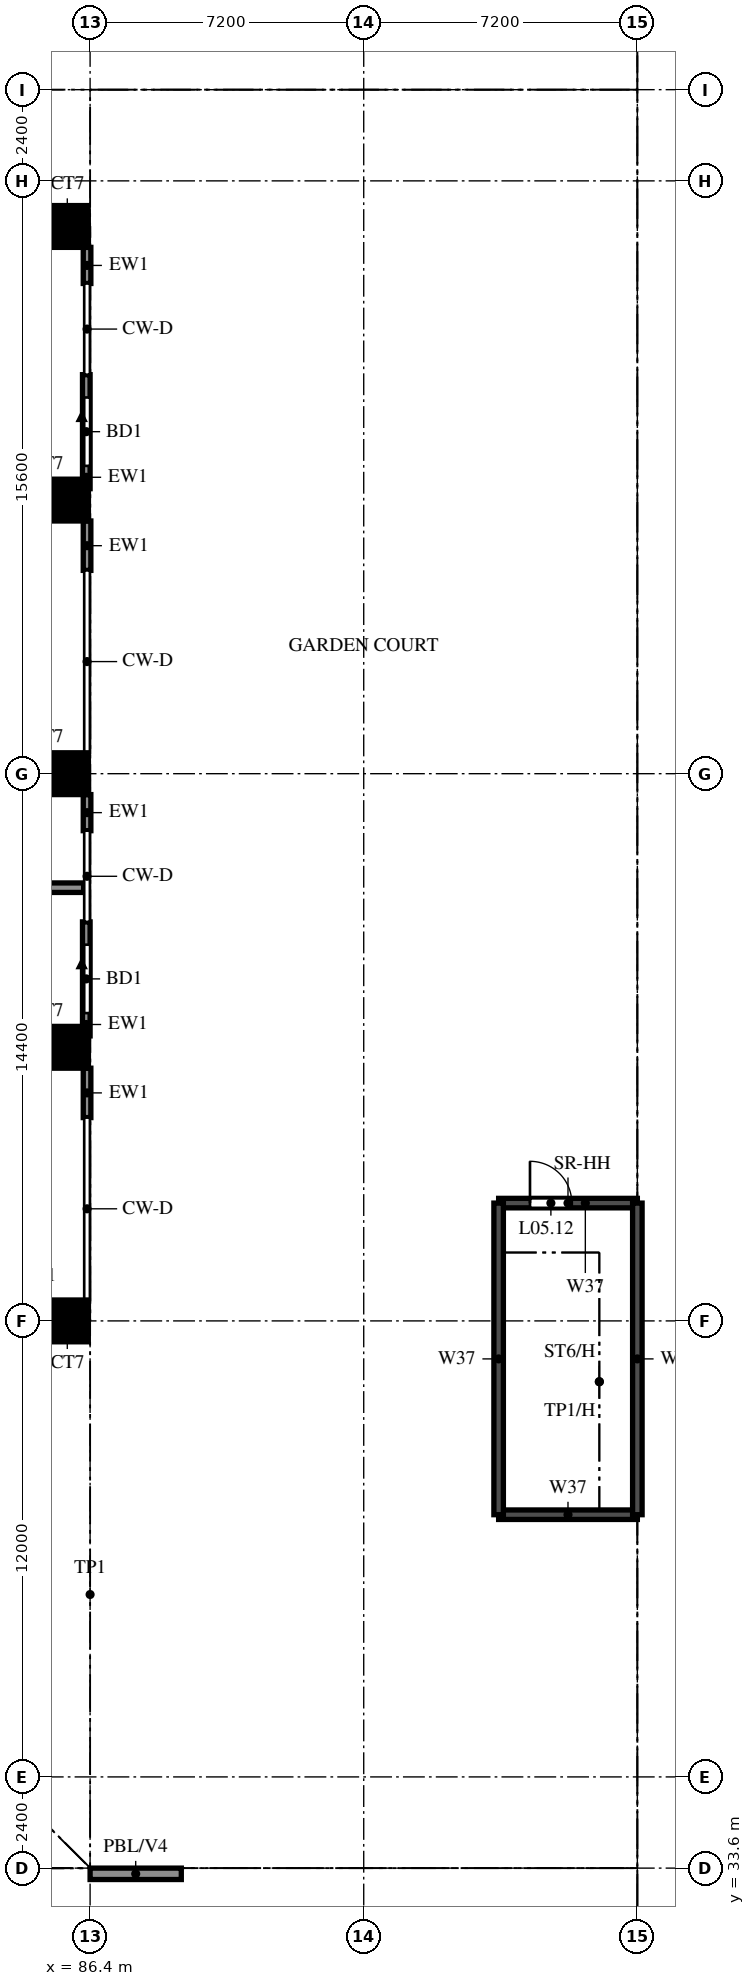
"""IFC4 building model, lengths in metres.
Left out: names, types, materials, properties, quantities, classifications, styles, units other than length and angle.
Written with IfcOpenShell. Run it as: python <this file> out.ifc"""

import sys

from ifc_helpers import new_model, si_unit, direction, frame, frame_2d, origin, origin_2d, place, context, subcontext, project, spatial, rectangle, extrude, source, transform, mapped, element, fill, save


model = new_model("IFC4")
c1 = context("Model", 3, precision=1e-05, world=origin(), true_north=direction((0.0, 1.0)))
c2 = subcontext(c1, "Body", "Model", "MODEL_VIEW")
j1 = project(units=[si_unit("LENGTHUNIT", "METRE"), si_unit("PLANEANGLEUNIT", "RADIAN")], contexts=[c1])
p1 = place(None, origin())
s1 = spatial("IfcSite", under=j1, at=p1, CompositionType="ELEMENT")
p2 = place(p1, origin())
s2 = spatial("IfcBuilding", under=s1, at=p2, CompositionType="ELEMENT")
p3 = place(p2, frame((0.0, 0.0, 27.0)))
s3 = spatial("IfcBuildingStorey", under=s2, at=p3, CompositionType="ELEMENT", Elevation=27.0)
m1 = source(origin(), c2, "Body", "SweptSolid", [
    extrude(rectangle(XDim=1.1, YDim=1.1, at=origin_2d()), origin(), (0.0, 0.0, 1.0), 3.18),
])
for number, where, z_axis, x_axis in (
    (1, (85.8, 48.0, 0.0), (0.0, 0.0, 1.0), (1.0, 0.0, 0.0)),
    (2, (85.8, 55.2, 0.0), (0.0, 0.0, 1.0), (1.0, 0.0, 0.0)),
    (3, (85.8, 62.4, 0.0), (0.0, 0.0, 1.0), (1.0, 0.0, 0.0)),
    (4, (85.8, 69.6, 0.0), (0.0, 0.0, 1.0), (1.0, 0.0, 0.0)),
    (5, (85.8, 76.8, 0.0), (0.0, 0.0, 1.0), (1.0, 0.0, 0.0)),
):
    element("IfcColumn", number, at=place(p3, frame(where, z_axis=z_axis, x_axis=x_axis)), inside=s3, PredefinedType="COLUMN", context=c2, shape_type="MappedRepresentation", body=[
        mapped(m1, transform((0.0, 0.0, 0.0))),
    ])
p4 = place(p3, frame((86.3, 55.5, 0.0), z_axis=(0.0, 0.0, 1.0), x_axis=(0.0, 1.0, 0.0)))
e6 = element("IfcWall", 6, at=p4, inside=s3, PredefinedType="SOLIDWALL", context=c2, shape_type="SweptSolid", body=[
    extrude(rectangle(XDim=3.0, YDim=0.2, at=frame_2d((1.5, 0.0))), origin(), (0.0, 0.0, 1.0), 3.18),
])
p5 = place(p4, frame((0.6, 0.0, 0.0)))
e7 = element("IfcOpeningElement", 7, at=p5, cuts=e6, PredefinedType="OPENING", context=c2, shape_type="SweptSolid", body=[
    extrude(rectangle(XDim=1.8, YDim=2.4, at=frame_2d((0.9, 1.2))), frame((0.0, 0.11, 0.0), z_axis=(0.0, -1.0, 0.0), x_axis=(1.0, 0.0, 0.0)), (0.0, 0.0, 1.0), 0.22),
])
p6 = place(p3, frame((86.3, 69.9, 0.0), z_axis=(0.0, 0.0, 1.0), x_axis=(0.0, 1.0, 0.0)))
e8 = element("IfcWall", 8, at=p6, inside=s3, PredefinedType="SOLIDWALL", context=c2, shape_type="SweptSolid", body=[
    extrude(rectangle(XDim=3.0, YDim=0.2, at=frame_2d((1.5, 0.0))), origin(), (0.0, 0.0, 1.0), 3.18),
])
p7 = place(p6, frame((0.6, 0.0, 0.0)))
e9 = element("IfcOpeningElement", 9, at=p7, cuts=e8, PredefinedType="OPENING", context=c2, shape_type="SweptSolid", body=[
    extrude(rectangle(XDim=1.8, YDim=2.4, at=frame_2d((0.9, 1.2))), frame((0.0, 0.11, 0.0), z_axis=(0.0, -1.0, 0.0), x_axis=(1.0, 0.0, 0.0)), (0.0, 0.0, 1.0), 0.22),
])
p8 = place(p3, frame((86.32, 53.35, 0.0), z_axis=(0.0, 0.0, 1.0), x_axis=(0.0, 1.0, 0.0)))
e10 = element("IfcWall", 10, at=p8, inside=s3, PredefinedType="SOLIDWALL", context=c2, shape_type="SweptSolid", body=[
    extrude(rectangle(XDim=1.3, YDim=0.2, at=frame_2d((0.65, 0.0))), origin(), (0.0, 0.0, 1.0), 3.18),
])
p9 = place(p3, frame((86.32, 60.9, 0.0), z_axis=(0.0, 0.0, 1.0), x_axis=(0.0, 1.0, 0.0)))
e11 = element("IfcWall", 11, at=p9, inside=s3, PredefinedType="SOLIDWALL", context=c2, shape_type="SweptSolid", body=[
    extrude(rectangle(XDim=0.95, YDim=0.2, at=frame_2d((0.475, 0.0))), origin(), (0.0, 0.0, 1.0), 3.18),
])
p10 = place(p3, frame((86.32, 67.75, 0.0), z_axis=(0.0, 0.0, 1.0), x_axis=(0.0, 1.0, 0.0)))
e12 = element("IfcWall", 12, at=p10, inside=s3, PredefinedType="SOLIDWALL", context=c2, shape_type="SweptSolid", body=[
    extrude(rectangle(XDim=1.3, YDim=0.2, at=frame_2d((0.65, 0.0))), origin(), (0.0, 0.0, 1.0), 3.18),
])
p11 = place(p3, frame((86.32, 75.3, 0.0), z_axis=(0.0, 0.0, 1.0), x_axis=(0.0, 1.0, 0.0)))
e13 = element("IfcWall", 13, at=p11, inside=s3, PredefinedType="SOLIDWALL", context=c2, shape_type="SweptSolid", body=[
    extrude(rectangle(XDim=0.95, YDim=0.2, at=frame_2d((0.475, 0.0))), origin(), (0.0, 0.0, 1.0), 3.18),
])
p12 = place(p3, frame((86.4, 33.45, -0.45), z_axis=(0.0, 0.0, 1.0), x_axis=(1.0, 0.0, 0.0)))
e14 = element("IfcWall", 14, at=p12, inside=s3, PredefinedType="SOLIDWALL", context=c2, shape_type="SweptSolid", body=[
    extrude(rectangle(XDim=2.4, YDim=0.3, at=frame_2d((1.2, 0.0))), origin(), (0.0, 0.0, 1.0), 3.63),
])
p13 = place(p3, frame((97.15, 42.9, 0.0), z_axis=(0.0, 0.0, 1.0), x_axis=(1.0, 0.0, 0.0)))
e15 = element("IfcWall", 15, at=p13, inside=s3, PredefinedType="SOLIDWALL", context=c2, shape_type="SweptSolid", body=[
    extrude(rectangle(XDim=3.65, YDim=0.25, at=frame_2d((1.825, 0.0))), origin(), (0.0, 0.0, 1.0), 3.18),
])
p14 = place(p3, frame((97.15, 51.1, 0.0), z_axis=(0.0, 0.0, 1.0), x_axis=(1.0, 0.0, 0.0)))
e16 = element("IfcWall", 16, at=p14, inside=s3, PredefinedType="SOLIDWALL", context=c2, shape_type="SweptSolid", body=[
    extrude(rectangle(XDim=3.65, YDim=0.25, at=frame_2d((1.825, 0.0))), origin(), (0.0, 0.0, 1.0), 3.18),
])
p15 = place(p14, frame((0.825, 0.0, 0.0)))
e17 = element("IfcOpeningElement", 17, at=p15, cuts=e16, PredefinedType="OPENING", context=c2, shape_type="SweptSolid", body=[
    extrude(rectangle(XDim=1.1, YDim=2.1, at=frame_2d((0.55, 1.05))), frame((0.0, 0.135, 0.0), z_axis=(0.0, -1.0, 0.0), x_axis=(1.0, 0.0, 0.0)), (0.0, 0.0, 1.0), 0.27),
])
p16 = place(p3, frame((70.2, 59.4, 0.0), z_axis=(0.0, 0.0, 1.0), x_axis=(1.0, 0.0, 0.0)))
e18 = element("IfcWall", 18, at=p16, inside=s3, PredefinedType="SOLIDWALL", context=c2, shape_type="SweptSolid", body=[
    extrude(rectangle(XDim=16.03, YDim=0.25, at=frame_2d((8.015, 0.0))), origin(), (0.0, 0.0, 1.0), 2.28),
])
p17 = place(p16, frame((7.55, 0.0, 0.0)))
e19 = element("IfcOpeningElement", 19, at=p17, cuts=e18, PredefinedType="OPENING", context=c2, shape_type="SweptSolid", body=[
    extrude(rectangle(XDim=1.1, YDim=2.1, at=frame_2d((0.55, 1.05))), frame((0.0, 0.135, 0.0), z_axis=(0.0, -1.0, 0.0), x_axis=(1.0, 0.0, 0.0)), (0.0, 0.0, 1.0), 0.27),
])
p18 = place(p3, frame((72.0, 62.4, 0.0), z_axis=(0.0, 0.0, 1.0), x_axis=(1.0, 0.0, 0.0)))
e20 = element("IfcWall", 20, at=p18, inside=s3, PredefinedType="SOLIDWALL", context=c2, shape_type="SweptSolid", body=[
    extrude(rectangle(XDim=14.23, YDim=0.25, at=frame_2d((7.115, 0.0))), origin(), (0.0, 0.0, 1.0), 3.18),
])
p19 = place(p18, frame((5.25, 0.0, 0.0)))
e21 = element("IfcOpeningElement", 21, at=p19, cuts=e20, PredefinedType="OPENING", context=c2, shape_type="SweptSolid", body=[
    extrude(rectangle(XDim=1.1, YDim=2.1, at=frame_2d((0.55, 1.05))), frame((0.0, 0.135, 0.0), z_axis=(0.0, -1.0, 0.0), x_axis=(1.0, 0.0, 0.0)), (0.0, 0.0, 1.0), 0.27),
])
for number, where, z_axis, x_axis in (
    (22, (97.15, 42.9, 0.0), (0.0, 0.0, 1.0), (0.0, 1.0, 0.0)),
    (23, (100.8, 42.9, 0.0), (0.0, 0.0, 1.0), (0.0, 1.0, 0.0)),
):
    element("IfcWall", number, at=place(p3, frame(where, z_axis=z_axis, x_axis=x_axis)), inside=s3, PredefinedType="SOLIDWALL", context=c2, shape_type="SweptSolid", body=[
        extrude(rectangle(XDim=8.2, YDim=0.25, at=frame_2d((4.1, 0.0))), origin(), (0.0, 0.0, 1.0), 3.18),
    ])
p20 = place(p5, origin())
e24 = element("IfcDoor", 24, at=p20, inside=s3, OperationType="DOUBLE_DOOR_SLIDING", PredefinedType="DOOR", context=c2, shape_type="SweptSolid", body=[
    extrude(rectangle(XDim=1.8, YDim=2.4, at=frame_2d((0.9, 1.2))), frame((0.0, 0.025, 0.0), z_axis=(0.0, -1.0, 0.0), x_axis=(1.0, 0.0, 0.0)), (0.0, 0.0, 1.0), 0.05),
])
fill(e7, e24)
p21 = place(p7, origin())
e25 = element("IfcDoor", 25, at=p21, inside=s3, OperationType="DOUBLE_DOOR_SLIDING", PredefinedType="DOOR", context=c2, shape_type="SweptSolid", body=[
    extrude(rectangle(XDim=1.8, YDim=2.4, at=frame_2d((0.9, 1.2))), frame((0.0, 0.025, 0.0), z_axis=(0.0, -1.0, 0.0), x_axis=(1.0, 0.0, 0.0)), (0.0, 0.0, 1.0), 0.05),
])
fill(e9, e25)
p22 = place(p15, origin())
e26 = element("IfcDoor", 26, at=p22, inside=s3, OperationType="SINGLE_SWING_LEFT", PredefinedType="DOOR", context=c2, shape_type="SweptSolid", body=[
    extrude(rectangle(XDim=1.1, YDim=2.1, at=frame_2d((0.55, 1.05))), frame((0.0, 0.025, 0.0), z_axis=(0.0, -1.0, 0.0), x_axis=(1.0, 0.0, 0.0)), (0.0, 0.0, 1.0), 0.05),
])
fill(e17, e26)
save(model, sys.argv[1])
